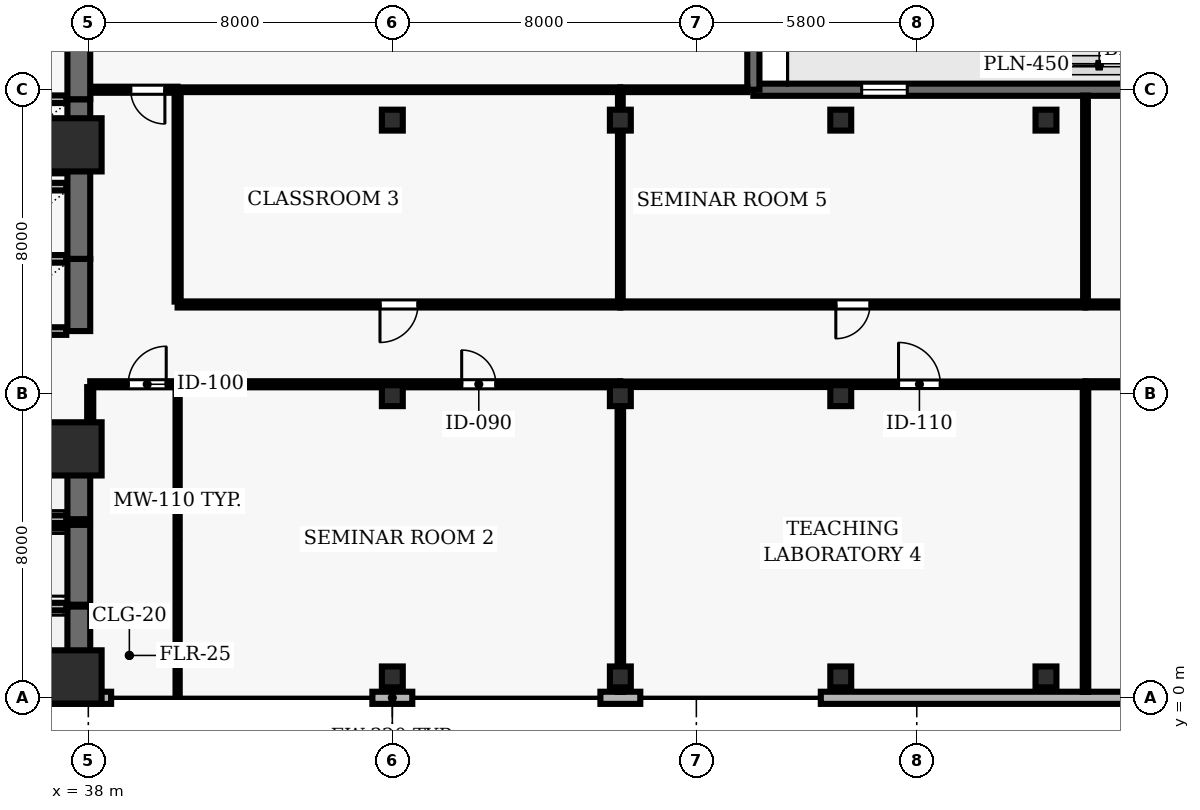
"""IFC4 building model, lengths in metres.
Left out: names, types, materials, properties, quantities, classifications, styles, units other than length and angle.
Written with IfcOpenShell. Run it as: python <this file> out.ifc"""

import sys

from ifc_helpers import new_model, si_unit, direction, frame, frame_2d, origin, origin_2d, place, context, subcontext, project, spatial, rectangle, hollow_rectangle, extrude, element, fill, save


model = new_model("IFC4")
c1 = context("Model", 3, precision=1e-05, world=origin(), true_north=direction((0.0, 1.0)))
c2 = subcontext(c1, "Body", "Model", "MODEL_VIEW")
j1 = project(units=[si_unit("LENGTHUNIT", "METRE"), si_unit("PLANEANGLEUNIT", "RADIAN")], contexts=[c1])
p1 = place(None, origin())
s1 = spatial("IfcSite", under=j1, at=p1, CompositionType="ELEMENT")
p2 = place(p1, origin())
s2 = spatial("IfcBuilding", under=s1, at=p2, CompositionType="ELEMENT")
p3 = place(p2, frame((0.0, 0.0, 38.8)))
s3 = spatial("IfcBuildingStorey", under=s2, at=p3, CompositionType="ELEMENT", Elevation=38.8)
for number, where, z_axis, x_axis in (
    (1, (37.65, 0.55, 0.0), (0.0, 0.0, 1.0), (1.0, 0.0, 0.0)),
    (2, (37.65, 6.55, 0.0), (0.0, 0.0, 1.0), (1.0, 0.0, 0.0)),
    (3, (37.65, 14.55, 0.0), (0.0, 0.0, 1.0), (1.0, 0.0, 0.0)),
):
    element("IfcColumn", number, at=place(p3, frame(where, z_axis=z_axis, x_axis=x_axis)), inside=s3, PredefinedType="COLUMN", context=c2, shape_type="SweptSolid", body=[
        extrude(rectangle(XDim=1.4, YDim=1.4, at=origin_2d()), origin(), (0.0, 0.0, 1.0), 3.9),
    ])
for number, where, z_axis, x_axis in (
    (4, (46.0, 0.55, 0.0), (0.0, 0.0, 1.0), (1.0, 0.0, 0.0)),
    (5, (46.0, 7.95, 0.0), (0.0, 0.0, 1.0), (1.0, 0.0, 0.0)),
    (6, (46.0, 15.2, 0.0), (0.0, 0.0, 1.0), (1.0, 0.0, 0.0)),
    (7, (52.0, 0.55, 0.0), (0.0, 0.0, 1.0), (1.0, 0.0, 0.0)),
    (8, (52.0, 7.95, 0.0), (0.0, 0.0, 1.0), (1.0, 0.0, 0.0)),
    (9, (52.0, 15.2, 0.0), (0.0, 0.0, 1.0), (1.0, 0.0, 0.0)),
    (10, (57.8, 0.55, 0.0), (0.0, 0.0, 1.0), (1.0, 0.0, 0.0)),
    (11, (57.8, 7.95, 0.0), (0.0, 0.0, 1.0), (1.0, 0.0, 0.0)),
    (12, (57.8, 15.2, 0.0), (0.0, 0.0, 1.0), (1.0, 0.0, 0.0)),
    (13, (63.2, 0.55, 0.0), (0.0, 0.0, 1.0), (1.0, 0.0, 0.0)),
    (14, (63.2, 15.2, 0.0), (0.0, 0.0, 1.0), (1.0, 0.0, 0.0)),
):
    element("IfcColumn", number, at=place(p3, frame(where, z_axis=z_axis, x_axis=x_axis)), inside=s3, PredefinedType="COLUMN", context=c2, shape_type="SweptSolid", body=[
        extrude(hollow_rectangle(XDim=0.55, YDim=0.55, WallThickness=0.025, at=origin_2d()), origin(), (0.0, 0.0, 1.0), 3.9),
    ])
p4 = place(p3, frame((30.8, 0.0, 0.0), z_axis=(0.0, 0.0, 1.0), x_axis=(1.0, 0.0, 0.0)))
e15 = element("IfcWall", 15, at=p4, inside=s3, PredefinedType="SOLIDWALL", context=c2, shape_type="SweptSolid", body=[
    extrude(rectangle(XDim=7.8, YDim=0.32, at=frame_2d((3.9, 0.0))), origin(), (0.0, 0.0, 1.0), 3.69),
])
for number, where, z_axis, x_axis in (
    (16, (45.475, 0.0, 0.0), (0.0, 0.0, 1.0), (1.0, 0.0, 0.0)),
    (17, (51.475, 0.0, 0.0), (0.0, 0.0, 1.0), (1.0, 0.0, 0.0)),
):
    element("IfcWall", number, at=place(p3, frame(where, z_axis=z_axis, x_axis=x_axis)), inside=s3, PredefinedType="SOLIDWALL", context=c2, shape_type="SweptSolid", body=[
        extrude(rectangle(XDim=1.05, YDim=0.32, at=frame_2d((0.525, 0.0))), origin(), (0.0, 0.0, 1.0), 3.69),
    ])
p5 = place(p3, frame((57.275, 0.0, 0.0), z_axis=(0.0, 0.0, 1.0), x_axis=(1.0, 0.0, 0.0)))
e18 = element("IfcWall", 18, at=p5, inside=s3, PredefinedType="SOLIDWALL", context=c2, shape_type="SweptSolid", body=[
    extrude(rectangle(XDim=16.225, YDim=0.32, at=frame_2d((8.113, 0.0))), origin(), (0.0, 0.0, 1.0), 3.69),
])
p6 = place(p3, frame((73.5, 16.0, 0.0), z_axis=(0.0, 0.0, 1.0), x_axis=(-1.0, 0.0, 0.0)))
e19 = element("IfcWall", 19, at=p6, inside=s3, PredefinedType="SOLIDWALL", context=c2, shape_type="SweptSolid", body=[
    extrude(rectangle(XDim=18.0, YDim=0.32, at=frame_2d((9.0, 0.0))), origin(), (0.0, 0.0, 1.0), 3.69),
])
p7 = place(p6, frame((7.3, 0.0, 0.0)))
e20 = element("IfcOpeningElement", 20, at=p7, cuts=e19, PredefinedType="OPENING", context=c2, shape_type="SweptSolid", body=[
    extrude(rectangle(XDim=1.0, YDim=2.2, at=frame_2d((0.5, 1.1))), frame((0.0, 0.17, 0.0), z_axis=(0.0, -1.0, 0.0), x_axis=(1.0, 0.0, 0.0)), (0.0, 0.0, 1.0), 0.34),
])
p8 = place(p6, frame((2.4, 0.0, 0.9)))
e21 = element("IfcOpeningElement", 21, at=p8, cuts=e19, PredefinedType="OPENING", context=c2, shape_type="SweptSolid", body=[
    extrude(rectangle(XDim=1.2, YDim=1.6, at=frame_2d((0.6, 0.8))), frame((0.0, 0.17, 0.0), z_axis=(0.0, -1.0, 0.0), x_axis=(1.0, 0.0, 0.0)), (0.0, 0.0, 1.0), 0.34),
])
p9 = place(p6, frame((13.95, 0.0, 0.9)))
e22 = element("IfcOpeningElement", 22, at=p9, cuts=e19, PredefinedType="OPENING", context=c2, shape_type="SweptSolid", body=[
    extrude(rectangle(XDim=1.2, YDim=1.6, at=frame_2d((0.6, 0.8))), frame((0.0, 0.17, 0.0), z_axis=(0.0, -1.0, 0.0), x_axis=(1.0, 0.0, 0.0)), (0.0, 0.0, 1.0), 0.34),
])
p10 = place(p3, frame((55.5, 16.0, 0.0), z_axis=(0.0, 0.0, 1.0), x_axis=(0.0, 1.0, 0.0)))
e23 = element("IfcWall", 23, at=p10, inside=s3, PredefinedType="SOLIDWALL", context=c2, shape_type="SweptSolid", body=[
    extrude(rectangle(XDim=11.4, YDim=0.32, at=frame_2d((5.7, 0.0))), origin(), (0.0, 0.0, 1.0), 3.69),
])
p11 = place(p10, frame((2.1, 0.0, 0.9)))
e24 = element("IfcOpeningElement", 24, at=p11, cuts=e23, PredefinedType="OPENING", context=c2, shape_type="SweptSolid", body=[
    extrude(rectangle(XDim=1.5, YDim=1.6, at=frame_2d((0.75, 0.8))), frame((0.0, 0.17, 0.0), z_axis=(0.0, -1.0, 0.0), x_axis=(1.0, 0.0, 0.0)), (0.0, 0.0, 1.0), 0.34),
])
p12 = place(p10, frame((7.8, 0.0, 0.9)))
e25 = element("IfcOpeningElement", 25, at=p12, cuts=e23, PredefinedType="OPENING", context=c2, shape_type="SweptSolid", body=[
    extrude(rectangle(XDim=1.5, YDim=1.6, at=frame_2d((0.75, 0.8))), frame((0.0, 0.17, 0.0), z_axis=(0.0, -1.0, 0.0), x_axis=(1.0, 0.0, 0.0)), (0.0, 0.0, 1.0), 0.34),
])
p13 = place(p3, frame((37.75, 0.3, 0.0), z_axis=(0.0, 0.0, 1.0), x_axis=(0.0, 1.0, 0.0)))
e26 = element("IfcWall", 26, at=p13, inside=s3, PredefinedType="SHEAR", context=c2, shape_type="SweptSolid", body=[
    extrude(rectangle(XDim=2.1, YDim=0.6, at=frame_2d((1.05, 0.0))), origin(), (0.0, 0.0, 1.0), 3.69),
])
for number, where, z_axis, x_axis in (
    (27, (35.28, 0.3, 0.0), (0.0, 0.0, 1.0), (1.0, 0.0, 0.0)),
    (28, (37.42, 2.4, 0.0), (0.0, 0.0, 1.0), (-1.0, 0.0, 0.0)),
):
    element("IfcWall", number, at=place(p3, frame(where, z_axis=z_axis, x_axis=x_axis)), inside=s3, PredefinedType="SOLIDWALL", context=c2, shape_type="SweptSolid", body=[
        extrude(rectangle(XDim=2.14, YDim=0.2, at=frame_2d((1.07, 0.0))), origin(), (0.0, 0.0, 1.0), 3.69),
    ])
p14 = place(p3, frame((37.75, 2.45, 0.0), z_axis=(0.0, 0.0, 1.0), x_axis=(0.0, 1.0, 0.0)))
e29 = element("IfcWall", 29, at=p14, inside=s3, PredefinedType="SHEAR", context=c2, shape_type="SweptSolid", body=[
    extrude(rectangle(XDim=2.1, YDim=0.6, at=frame_2d((1.05, 0.0))), origin(), (0.0, 0.0, 1.0), 3.69),
])
p15 = place(p3, frame((37.42, 4.55, 0.0), z_axis=(0.0, 0.0, 1.0), x_axis=(-1.0, 0.0, 0.0)))
e30 = element("IfcWall", 30, at=p15, inside=s3, PredefinedType="SOLIDWALL", context=c2, shape_type="SweptSolid", body=[
    extrude(rectangle(XDim=2.14, YDim=0.2, at=frame_2d((1.07, 0.0))), origin(), (0.0, 0.0, 1.0), 3.69),
])
p16 = place(p3, frame((37.75, 4.7, 0.0), z_axis=(0.0, 0.0, 1.0), x_axis=(0.0, 1.0, 0.0)))
e31 = element("IfcWall", 31, at=p16, inside=s3, PredefinedType="SHEAR", context=c2, shape_type="SweptSolid", body=[
    extrude(rectangle(XDim=2.25, YDim=0.6, at=frame_2d((1.125, 0.0))), origin(), (0.0, 0.0, 1.0), 3.69),
])
for number, where, z_axis, x_axis in (
    (32, (35.28, 4.7, 0.0), (0.0, 0.0, 1.0), (1.0, 0.0, 0.0)),
    (33, (37.42, 6.95, 0.0), (0.0, 0.0, 1.0), (-1.0, 0.0, 0.0)),
):
    element("IfcWall", number, at=place(p3, frame(where, z_axis=z_axis, x_axis=x_axis)), inside=s3, PredefinedType="SOLIDWALL", context=c2, shape_type="SweptSolid", body=[
        extrude(rectangle(XDim=2.14, YDim=0.2, at=frame_2d((1.07, 0.0))), origin(), (0.0, 0.0, 1.0), 3.69),
    ])
p17 = place(p3, frame((37.75, 9.65, 0.0), z_axis=(0.0, 0.0, 1.0), x_axis=(0.0, 1.0, 0.0)))
e34 = element("IfcWall", 34, at=p17, inside=s3, PredefinedType="SHEAR", context=c2, shape_type="SweptSolid", body=[
    extrude(rectangle(XDim=1.9, YDim=0.6, at=frame_2d((0.95, 0.0))), origin(), (0.0, 0.0, 1.0), 3.69),
])
for number, where, z_axis, x_axis in (
    (35, (35.28, 9.65, 0.0), (0.0, 0.0, 1.0), (1.0, 0.0, 0.0)),
    (36, (37.42, 11.55, 0.0), (0.0, 0.0, 1.0), (-1.0, 0.0, 0.0)),
):
    element("IfcWall", number, at=place(p3, frame(where, z_axis=z_axis, x_axis=x_axis)), inside=s3, PredefinedType="SOLIDWALL", context=c2, shape_type="SweptSolid", body=[
        extrude(rectangle(XDim=2.14, YDim=0.2, at=frame_2d((1.07, 0.0))), origin(), (0.0, 0.0, 1.0), 3.69),
    ])
p18 = place(p3, frame((37.75, 11.55, 0.0), z_axis=(0.0, 0.0, 1.0), x_axis=(0.0, 1.0, 0.0)))
e37 = element("IfcWall", 37, at=p18, inside=s3, PredefinedType="SHEAR", context=c2, shape_type="SweptSolid", body=[
    extrude(rectangle(XDim=2.35, YDim=0.6, at=frame_2d((1.175, 0.0))), origin(), (0.0, 0.0, 1.0), 3.69),
])
p19 = place(p3, frame((37.42, 13.45, 0.0), z_axis=(0.0, 0.0, 1.0), x_axis=(-1.0, 0.0, 0.0)))
e38 = element("IfcWall", 38, at=p19, inside=s3, PredefinedType="SOLIDWALL", context=c2, shape_type="SweptSolid", body=[
    extrude(rectangle(XDim=2.14, YDim=0.2, at=frame_2d((1.07, 0.0))), origin(), (0.0, 0.0, 1.0), 3.69),
])
p20 = place(p3, frame((37.75, 13.9, 0.0), z_axis=(0.0, 0.0, 1.0), x_axis=(0.0, 1.0, 0.0)))
e39 = element("IfcWall", 39, at=p20, inside=s3, PredefinedType="SHEAR", context=c2, shape_type="SweptSolid", body=[
    extrude(rectangle(XDim=1.85, YDim=0.6, at=frame_2d((0.925, 0.0))), origin(), (0.0, 0.0, 1.0), 3.69),
])
for number, where, z_axis, x_axis in (
    (40, (35.28, 13.9, 0.0), (0.0, 0.0, 1.0), (1.0, 0.0, 0.0)),
    (41, (37.42, 15.75, 0.0), (0.0, 0.0, 1.0), (-1.0, 0.0, 0.0)),
):
    element("IfcWall", number, at=place(p3, frame(where, z_axis=z_axis, x_axis=x_axis)), inside=s3, PredefinedType="SOLIDWALL", context=c2, shape_type="SweptSolid", body=[
        extrude(rectangle(XDim=2.14, YDim=0.2, at=frame_2d((1.07, 0.0))), origin(), (0.0, 0.0, 1.0), 3.69),
    ])
p21 = place(p3, frame((37.75, 15.75, 0.0), z_axis=(0.0, 0.0, 1.0), x_axis=(0.0, 1.0, 0.0)))
e42 = element("IfcWall", 42, at=p21, inside=s3, PredefinedType="SHEAR", context=c2, shape_type="SweptSolid", body=[
    extrude(rectangle(XDim=1.85, YDim=0.6, at=frame_2d((0.925, 0.0))), origin(), (0.0, 0.0, 1.0), 3.69),
])
p22 = place(p3, frame((38.05, 8.25, 0.0), z_axis=(0.0, 0.0, 1.0), x_axis=(1.0, 0.0, 0.0)))
e43 = element("IfcWall", 43, at=p22, inside=s3, PredefinedType="PARTITIONING", context=c2, shape_type="SweptSolid", body=[
    extrude(rectangle(XDim=2.3, YDim=0.16, at=frame_2d((1.15, 0.0))), origin(), (0.0, 0.0, 1.0), 2.995),
])
p23 = place(p22, frame((1.0, 0.0, 0.0)))
e44 = element("IfcOpeningElement", 44, at=p23, cuts=e43, PredefinedType="OPENING", context=c2, shape_type="SweptSolid", body=[
    extrude(rectangle(XDim=1.0, YDim=2.1, at=frame_2d((0.5, 1.05))), frame((0.0, 0.09, 0.0), z_axis=(0.0, -1.0, 0.0), x_axis=(1.0, 0.0, 0.0)), (0.0, 0.0, 1.0), 0.18),
])
p24 = place(p3, frame((40.35, 8.25, 0.0), z_axis=(0.0, 0.0, 1.0), x_axis=(1.0, 0.0, 0.0)))
e45 = element("IfcWall", 45, at=p24, inside=s3, PredefinedType="PARTITIONING", context=c2, shape_type="SweptSolid", body=[
    extrude(rectangle(XDim=11.65, YDim=0.16, at=frame_2d((5.825, 0.0))), origin(), (0.0, 0.0, 1.0), 2.995),
])
p25 = place(p24, frame((7.475, 0.0, 0.0)))
e46 = element("IfcOpeningElement", 46, at=p25, cuts=e45, PredefinedType="OPENING", context=c2, shape_type="SweptSolid", body=[
    extrude(rectangle(XDim=0.9, YDim=2.1, at=frame_2d((0.45, 1.05))), frame((0.0, 0.09, 0.0), z_axis=(0.0, -1.0, 0.0), x_axis=(1.0, 0.0, 0.0)), (0.0, 0.0, 1.0), 0.18),
])
p26 = place(p3, frame((40.35, 16.0, 0.0), z_axis=(0.0, 0.0, 1.0), x_axis=(-1.0, 0.0, 0.0)))
e47 = element("IfcWall", 47, at=p26, inside=s3, PredefinedType="PARTITIONING", context=c2, shape_type="SweptSolid", body=[
    extrude(rectangle(XDim=2.27, YDim=0.16, at=frame_2d((1.135, 0.0))), origin(), (0.0, 0.0, 1.0), 3.69),
])
p27 = place(p26, frame((0.335, 0.0, 0.0)))
e48 = element("IfcOpeningElement", 48, at=p27, cuts=e47, PredefinedType="OPENING", context=c2, shape_type="SweptSolid", body=[
    extrude(rectangle(XDim=0.9, YDim=2.1, at=frame_2d((0.45, 1.05))), frame((0.0, 0.09, 0.0), z_axis=(0.0, -1.0, 0.0), x_axis=(1.0, 0.0, 0.0)), (0.0, 0.0, 1.0), 0.18),
])
p28 = place(p3, frame((52.0, 8.25, 0.0), z_axis=(0.0, 0.0, 1.0), x_axis=(1.0, 0.0, 0.0)))
e49 = element("IfcWall", 49, at=p28, inside=s3, PredefinedType="PARTITIONING", context=c2, shape_type="SweptSolid", body=[
    extrude(rectangle(XDim=12.24, YDim=0.145, at=frame_2d((6.12, 0.0))), origin(), (0.0, 0.0, 1.0), 2.995),
])
p29 = place(p28, frame((7.32, 0.0, 0.0)))
e50 = element("IfcOpeningElement", 50, at=p29, cuts=e49, PredefinedType="OPENING", context=c2, shape_type="SweptSolid", body=[
    extrude(rectangle(XDim=1.1, YDim=2.15, at=frame_2d((0.55, 1.075))), frame((0.0, 0.083, 0.0), z_axis=(0.0, -1.0, 0.0), x_axis=(1.0, 0.0, 0.0)), (0.0, 0.0, 1.0), 0.165),
])
p30 = place(p3, frame((52.0, 10.35, 0.0), z_axis=(0.0, 0.0, 1.0), x_axis=(-1.0, 0.0, 0.0)))
e51 = element("IfcWall", 51, at=p30, inside=s3, PredefinedType="PARTITIONING", context=c2, shape_type="SweptSolid", body=[
    extrude(rectangle(XDim=11.65, YDim=0.16, at=frame_2d((5.825, 0.0))), origin(), (0.0, 0.0, 1.0), 3.227),
])
p31 = place(p30, frame((5.325, 0.0, 0.0)))
e52 = element("IfcOpeningElement", 52, at=p31, cuts=e51, PredefinedType="OPENING", context=c2, shape_type="SweptSolid", body=[
    extrude(rectangle(XDim=1.0, YDim=2.1, at=frame_2d((0.5, 1.05))), frame((0.0, 0.09, 0.0), z_axis=(0.0, -1.0, 0.0), x_axis=(1.0, 0.0, 0.0)), (0.0, 0.0, 1.0), 0.18),
])
p32 = place(p3, frame((52.0, 16.0, 0.0), z_axis=(0.0, 0.0, 1.0), x_axis=(1.0, 0.0, 0.0)))
e53 = element("IfcWall", 53, at=p32, inside=s3, PredefinedType="PARTITIONING", context=c2, shape_type="SweptSolid", body=[
    extrude(rectangle(XDim=3.345, YDim=0.125, at=frame_2d((1.672, 0.0))), origin(), (0.0, 0.0, 1.0), 3.39),
])
p33 = place(p3, frame((52.0, 16.0, 0.0), z_axis=(0.0, 0.0, 1.0), x_axis=(-1.0, 0.0, 0.0)))
e54 = element("IfcWall", 54, at=p33, inside=s3, PredefinedType="PARTITIONING", context=c2, shape_type="SweptSolid", body=[
    extrude(rectangle(XDim=11.65, YDim=0.125, at=frame_2d((5.825, 0.0))), origin(), (0.0, 0.0, 1.0), 3.69),
])
p34 = place(p3, frame((64.24, 8.25, 0.0), z_axis=(0.0, 0.0, 1.0), x_axis=(1.0, 0.0, 0.0)))
e55 = element("IfcWall", 55, at=p34, inside=s3, PredefinedType="PARTITIONING", context=c2, shape_type="SweptSolid", body=[
    extrude(rectangle(XDim=11.605, YDim=0.16, at=frame_2d((5.802, 0.0))), origin(), (0.0, 0.0, 1.0), 3.69),
])
p35 = place(p34, frame((5.303, 0.0, 0.0)))
e56 = element("IfcOpeningElement", 56, at=p35, cuts=e55, PredefinedType="OPENING", context=c2, shape_type="SweptSolid", body=[
    extrude(rectangle(XDim=1.0, YDim=2.1, at=frame_2d((0.5, 1.05))), frame((0.0, 0.09, 0.0), z_axis=(0.0, -1.0, 0.0), x_axis=(1.0, 0.0, 0.0)), (0.0, 0.0, 1.0), 0.18),
])
p36 = place(p3, frame((64.24, 10.35, 0.0), z_axis=(0.0, 0.0, 1.0), x_axis=(-1.0, 0.0, 0.0)))
e57 = element("IfcWall", 57, at=p36, inside=s3, PredefinedType="PARTITIONING", context=c2, shape_type="SweptSolid", body=[
    extrude(rectangle(XDim=12.24, YDim=0.16, at=frame_2d((6.12, 0.0))), origin(), (0.0, 0.0, 1.0), 3.227),
])
p37 = place(p36, frame((5.67, 0.0, 0.0)))
e58 = element("IfcOpeningElement", 58, at=p37, cuts=e57, PredefinedType="OPENING", context=c2, shape_type="SweptSolid", body=[
    extrude(rectangle(XDim=0.9, YDim=2.1, at=frame_2d((0.45, 1.05))), frame((0.0, 0.09, 0.0), z_axis=(0.0, -1.0, 0.0), x_axis=(1.0, 0.0, 0.0)), (0.0, 0.0, 1.0), 0.18),
])
p38 = place(p3, frame((75.845, 10.35, 0.0), z_axis=(0.0, 0.0, 1.0), x_axis=(-1.0, 0.0, 0.0)))
e59 = element("IfcWall", 59, at=p38, inside=s3, PredefinedType="PARTITIONING", context=c2, shape_type="SweptSolid", body=[
    extrude(rectangle(XDim=11.605, YDim=0.16, at=frame_2d((5.802, 0.0))), origin(), (0.0, 0.0, 1.0), 3.227),
])
p39 = place(p38, frame((5.353, 0.0, 0.0)))
e60 = element("IfcOpeningElement", 60, at=p39, cuts=e59, PredefinedType="OPENING", context=c2, shape_type="SweptSolid", body=[
    extrude(rectangle(XDim=0.9, YDim=2.1, at=frame_2d((0.45, 1.05))), frame((0.0, 0.09, 0.0), z_axis=(0.0, -1.0, 0.0), x_axis=(1.0, 0.0, 0.0)), (0.0, 0.0, 1.0), 0.18),
])
p40 = place(p3, frame((38.05, 7.05, 0.0), z_axis=(0.0, 0.0, 1.0), x_axis=(0.0, 1.0, 0.0)))
e61 = element("IfcWall", 61, at=p40, inside=s3, PredefinedType="PARTITIONING", context=c2, shape_type="SweptSolid", body=[
    extrude(rectangle(XDim=1.125, YDim=0.16, at=frame_2d((0.562, 0.0))), origin(), (0.0, 0.0, 1.0), 2.995),
])
p41 = place(p3, frame((40.35, 0.09, 0.0), z_axis=(0.0, 0.0, 1.0), x_axis=(0.0, 1.0, 0.0)))
e62 = element("IfcWall", 62, at=p41, inside=s3, PredefinedType="MOVABLE", context=c2, shape_type="SweptSolid", body=[
    extrude(rectangle(XDim=8.085, YDim=0.11, at=frame_2d((4.042, 0.0))), origin(), (0.0, 0.0, 1.0), 3.69),
])
p42 = place(p3, frame((40.35, 10.425, 0.0), z_axis=(0.0, 0.0, 1.0), x_axis=(0.0, 1.0, 0.0)))
e63 = element("IfcWall", 63, at=p42, inside=s3, PredefinedType="PARTITIONING", context=c2, shape_type="SweptSolid", body=[
    extrude(rectangle(XDim=5.5, YDim=0.16, at=frame_2d((2.75, 0.0))), origin(), (0.0, 0.0, 1.0), 3.227),
])
p43 = place(p3, frame((52.0, 0.155, 0.0), z_axis=(0.0, 0.0, 1.0), x_axis=(0.0, 1.0, 0.0)))
e64 = element("IfcWall", 64, at=p43, inside=s3, PredefinedType="PARTITIONING", context=c2, shape_type="SweptSolid", body=[
    extrude(rectangle(XDim=8.02, YDim=0.145, at=frame_2d((4.01, 0.0))), origin(), (0.0, 0.0, 1.0), 2.995),
])
p44 = place(p3, frame((52.0, 10.425, 0.0), z_axis=(0.0, 0.0, 1.0), x_axis=(0.0, 1.0, 0.0)))
e65 = element("IfcWall", 65, at=p44, inside=s3, PredefinedType="PARTITIONING", context=c2, shape_type="SweptSolid", body=[
    extrude(rectangle(XDim=5.518, YDim=0.125, at=frame_2d((2.759, 0.0))), origin(), (0.0, 0.0, 1.0), 2.995),
])
p45 = place(p3, frame((64.24, 0.155, 0.0), z_axis=(0.0, 0.0, 1.0), x_axis=(0.0, 1.0, 0.0)))
e66 = element("IfcWall", 66, at=p45, inside=s3, PredefinedType="PARTITIONING", context=c2, shape_type="SweptSolid", body=[
    extrude(rectangle(XDim=8.02, YDim=0.145, at=frame_2d((4.01, 0.0))), origin(), (0.0, 0.0, 1.0), 3.69),
])
p46 = place(p3, frame((64.24, 10.425, 0.0), z_axis=(0.0, 0.0, 1.0), x_axis=(0.0, 1.0, 0.0)))
e67 = element("IfcWall", 67, at=p46, inside=s3, PredefinedType="PARTITIONING", context=c2, shape_type="SweptSolid", body=[
    extrude(rectangle(XDim=5.42, YDim=0.125, at=frame_2d((2.71, 0.0))), origin(), (0.0, 0.0, 1.0), 3.69),
])
p47 = place(p9, origin())
e68 = element("IfcWindow", 68, at=p47, inside=s3, PartitioningType="SINGLE_PANEL", PredefinedType="WINDOW", context=c2, shape_type="SweptSolid", body=[
    extrude(rectangle(XDim=1.2, YDim=1.6, at=frame_2d((0.6, 0.8))), frame((0.0, 0.03, 0.0), z_axis=(0.0, -1.0, 0.0), x_axis=(1.0, 0.0, 0.0)), (0.0, 0.0, 1.0), 0.06),
])
fill(e22, e68)
p48 = place(p23, origin())
e69 = element("IfcDoor", 69, at=p48, inside=s3, OperationType="SINGLE_SWING_RIGHT", PredefinedType="DOOR", context=c2, shape_type="SweptSolid", body=[
    extrude(rectangle(XDim=1.0, YDim=2.1, at=frame_2d((0.5, 1.05))), frame((0.0, 0.025, 0.0), z_axis=(0.0, -1.0, 0.0), x_axis=(1.0, 0.0, 0.0)), (0.0, 0.0, 1.0), 0.05),
])
fill(e44, e69)
p49 = place(p25, origin())
e70 = element("IfcDoor", 70, at=p49, inside=s3, OperationType="SINGLE_SWING_LEFT", PredefinedType="DOOR", context=c2, shape_type="SweptSolid", body=[
    extrude(rectangle(XDim=0.9, YDim=2.1, at=frame_2d((0.45, 1.05))), frame((0.0, 0.025, 0.0), z_axis=(0.0, -1.0, 0.0), x_axis=(1.0, 0.0, 0.0)), (0.0, 0.0, 1.0), 0.05),
])
fill(e46, e70)
p50 = place(p31, origin())
e71 = element("IfcDoor", 71, at=p50, inside=s3, OperationType="SINGLE_SWING_RIGHT", PredefinedType="DOOR", context=c2, shape_type="SweptSolid", body=[
    extrude(rectangle(XDim=1.0, YDim=2.1, at=frame_2d((0.5, 1.05))), frame((0.0, 0.025, 0.0), z_axis=(0.0, -1.0, 0.0), x_axis=(1.0, 0.0, 0.0)), (0.0, 0.0, 1.0), 0.05),
])
fill(e52, e71)
p51 = place(p29, origin())
e72 = element("IfcDoor", 72, at=p51, inside=s3, OperationType="SINGLE_SWING_LEFT", PredefinedType="DOOR", context=c2, shape_type="SweptSolid", body=[
    extrude(rectangle(XDim=1.1, YDim=2.15, at=frame_2d((0.55, 1.075))), frame((0.0, 0.025, 0.0), z_axis=(0.0, -1.0, 0.0), x_axis=(1.0, 0.0, 0.0)), (0.0, 0.0, 1.0), 0.05),
])
fill(e50, e72)
p52 = place(p37, origin())
e73 = element("IfcDoor", 73, at=p52, inside=s3, OperationType="SINGLE_SWING_RIGHT", PredefinedType="DOOR", context=c2, shape_type="SweptSolid", body=[
    extrude(rectangle(XDim=0.9, YDim=2.1, at=frame_2d((0.45, 1.05))), frame((0.0, 0.025, 0.0), z_axis=(0.0, -1.0, 0.0), x_axis=(1.0, 0.0, 0.0)), (0.0, 0.0, 1.0), 0.05),
])
fill(e58, e73)
p53 = place(p27, origin())
e74 = element("IfcDoor", 74, at=p53, inside=s3, OperationType="SINGLE_SWING_LEFT", PredefinedType="DOOR", context=c2, shape_type="SweptSolid", body=[
    extrude(rectangle(XDim=0.9, YDim=2.1, at=frame_2d((0.45, 1.05))), frame((0.0, 0.025, 0.0), z_axis=(0.0, -1.0, 0.0), x_axis=(1.0, 0.0, 0.0)), (0.0, 0.0, 1.0), 0.05),
])
fill(e48, e74)
save(model, sys.argv[1])
